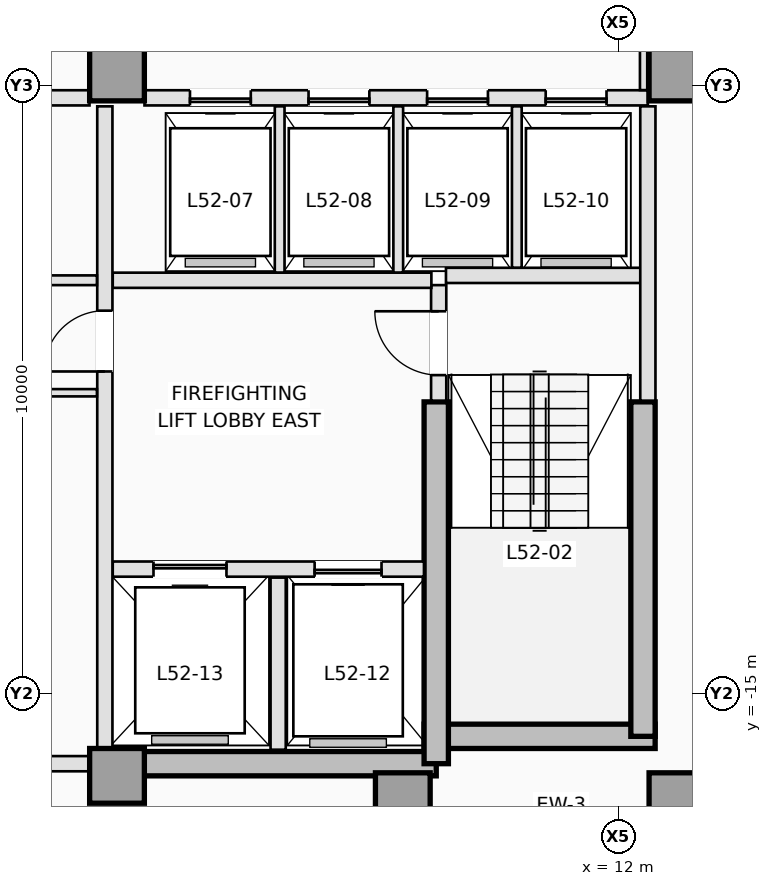
"""IFC4 building model, lengths in metres.
Left out: names, types, materials, properties, quantities, classifications, styles, units other than length and angle.
Written with IfcOpenShell. Run it as: python <this file> out.ifc"""

import sys

from ifc_helpers import new_model, si_unit, direction, frame, frame_2d, origin, origin_2d, place, context, subcontext, project, spatial, rectangle, extrude, element, fill, save


model = new_model("IFC4")
c1 = context("Model", 3, precision=1e-05, world=origin(), true_north=direction((0.0, 1.0)))
c2 = subcontext(c1, "Body", "Model", "MODEL_VIEW")
j1 = project(units=[si_unit("LENGTHUNIT", "METRE"), si_unit("PLANEANGLEUNIT", "RADIAN")], contexts=[c1])
p1 = place(None, origin())
s1 = spatial("IfcSite", under=j1, at=p1, CompositionType="ELEMENT")
p2 = place(p1, origin())
s2 = spatial("IfcBuilding", under=s1, at=p2, CompositionType="ELEMENT")
p3 = place(p2, frame((0.0, 0.0, 190.4)))
s3 = spatial("IfcBuildingStorey", under=s2, at=p3, CompositionType="ELEMENT", Elevation=190.4)
p4 = place(p3, frame((3.75, -16.15, 0.0), z_axis=(0.0, 0.0, 1.0), x_axis=(1.0, 0.0, 0.0)))
e1 = element("IfcWall", 1, at=p4, inside=s3, PredefinedType="SHEAR", context=c2, shape_type="SweptSolid", body=[
    extrude(rectangle(XDim=5.25, YDim=0.4, at=frame_2d((2.625, 0.0))), origin(), (0.0, 0.0, 1.0), 3.5),
])
p5 = place(p3, frame((8.8, -15.7, 0.0), z_axis=(0.0, 0.0, 1.0), x_axis=(1.0, 0.0, 0.0)))
e2 = element("IfcWall", 2, at=p5, inside=s3, PredefinedType="SHEAR", context=c2, shape_type="SweptSolid", body=[
    extrude(rectangle(XDim=3.8, YDim=0.4, at=frame_2d((1.9, 0.0))), origin(), (0.0, 0.0, 1.0), 3.5),
])
p6 = place(p3, frame((12.4, -15.7, 0.0), z_axis=(0.0, 0.0, 1.0), x_axis=(0.0, 1.0, 0.0)))
e3 = element("IfcWall", 3, at=p6, inside=s3, PredefinedType="SHEAR", context=c2, shape_type="SweptSolid", body=[
    extrude(rectangle(XDim=5.5, YDim=0.4, at=frame_2d((2.75, 0.0))), origin(), (0.0, 0.0, 1.0), 3.5),
])
p7 = place(p3, frame((9.0, -16.15, 0.0), z_axis=(0.0, 0.0, 1.0), x_axis=(0.0, 1.0, 0.0)))
e4 = element("IfcWall", 4, at=p7, inside=s3, PredefinedType="SHEAR", context=c2, shape_type="SweptSolid", body=[
    extrude(rectangle(XDim=5.95, YDim=0.4, at=frame_2d((2.975, 0.0))), origin(), (0.0, 0.0, 1.0), 3.5),
])
for number, where, z_axis, x_axis in (
    (5, (3.75, -16.35, 0.0), (0.0, 0.0, 1.0), (1.0, 0.0, 0.0)),
    (6, (8.45, -16.75, 0.0), (0.0, 0.0, 1.0), (1.0, 0.0, 0.0)),
    (7, (12.95, -16.75, 0.0), (0.0, 0.0, 1.0), (1.0, 0.0, 0.0)),
    (8, (3.75, -4.8, 0.0), (0.0, 0.0, 1.0), (1.0, 0.0, 0.0)),
    (9, (12.95, -4.8, 0.0), (0.0, 0.0, 1.0), (1.0, 0.0, 0.0)),
):
    element("IfcColumn", number, at=place(p3, frame(where, z_axis=z_axis, x_axis=x_axis)), inside=s3, PredefinedType="COLUMN", context=c2, shape_type="SweptSolid", body=[
        extrude(rectangle(XDim=0.9, YDim=0.9, at=origin_2d()), origin(), (0.0, 0.0, 1.0), 3.5),
    ])
p8 = place(p3, frame((9.04, -10.18, 0.0), z_axis=(0.0, 0.0, 1.0), x_axis=(0.0, 1.0, 0.0)))
e10 = element("IfcWall", 10, at=p8, inside=s3, PredefinedType="PARTITIONING", context=c2, shape_type="SweptSolid", body=[
    extrude(rectangle(XDim=1.9, YDim=0.25, at=frame_2d((0.95, 0.0))), origin(), (0.0, 0.0, 1.0), 3.25),
])
p9 = place(p8, frame((0.42, 0.0, 0.0)))
e11 = element("IfcOpeningElement", 11, at=p9, cuts=e10, PredefinedType="OPENING", context=c2, shape_type="SweptSolid", body=[
    extrude(rectangle(XDim=1.05, YDim=2.15, at=frame_2d((0.525, 1.075))), frame((0.0, 0.135, 0.0), z_axis=(0.0, -1.0, 0.0), x_axis=(1.0, 0.0, 0.0)), (0.0, 0.0, 1.0), 0.27),
])
p10 = place(p3, frame((9.16, -8.12, 0.0), z_axis=(0.0, 0.0, 1.0), x_axis=(1.0, 0.0, 0.0)))
e12 = element("IfcWall", 12, at=p10, inside=s3, PredefinedType="PARTITIONING", context=c2, shape_type="SweptSolid", body=[
    extrude(rectangle(XDim=3.22, YDim=0.25, at=frame_2d((1.61, 0.0))), origin(), (0.0, 0.0, 1.0), 3.25),
])
p11 = place(p3, frame((12.48, -10.18, 0.0), z_axis=(0.0, 0.0, 1.0), x_axis=(0.0, 1.0, 0.0)))
e13 = element("IfcWall", 13, at=p11, inside=s3, PredefinedType="PARTITIONING", context=c2, shape_type="SweptSolid", body=[
    extrude(rectangle(XDim=4.84, YDim=0.25, at=frame_2d((2.42, 0.0))), origin(), (0.0, 0.0, 1.0), 3.25),
])
p12 = place(p3, frame((3.68, -12.95, 0.0), z_axis=(0.0, 0.0, 1.0), x_axis=(1.0, 0.0, 0.0)))
e14 = element("IfcWall", 14, at=p12, inside=s3, PredefinedType="PARTITIONING", context=c2, shape_type="SweptSolid", body=[
    extrude(rectangle(XDim=5.118, YDim=0.25, at=frame_2d((2.559, 0.0))), origin(), (0.0, 0.0, 1.0), 3.25),
])
p13 = place(p12, frame((3.32, 0.0, 0.0)))
e15 = element("IfcOpeningElement", 15, at=p13, cuts=e14, PredefinedType="OPENING", context=c2, shape_type="SweptSolid", body=[
    extrude(rectangle(XDim=1.1, YDim=2.15, at=frame_2d((0.55, 1.075))), frame((0.0, 0.135, 0.0), z_axis=(0.0, -1.0, 0.0), x_axis=(1.0, 0.0, 0.0)), (0.0, 0.0, 1.0), 0.27),
])
p14 = place(p12, frame((0.67, 0.0, 0.0)))
e16 = element("IfcOpeningElement", 16, at=p14, cuts=e14, PredefinedType="OPENING", context=c2, shape_type="SweptSolid", body=[
    extrude(rectangle(XDim=1.2, YDim=2.15, at=frame_2d((0.6, 1.075))), frame((0.0, 0.135, 0.0), z_axis=(0.0, -1.0, 0.0), x_axis=(1.0, 0.0, 0.0)), (0.0, 0.0, 1.0), 0.27),
])
p15 = place(p3, frame((6.4, -15.92, 0.0), z_axis=(0.0, 0.0, 1.0), x_axis=(0.0, 1.0, 0.0)))
e17 = element("IfcWall", 17, at=p15, inside=s3, PredefinedType="PARTITIONING", context=c2, shape_type="SweptSolid", body=[
    extrude(rectangle(XDim=2.83, YDim=0.25, at=frame_2d((1.415, 0.0))), origin(), (0.0, 0.0, 1.0), 3.25),
])
p16 = place(p3, frame((3.68, -8.2, 0.0), z_axis=(0.0, 0.0, 1.0), x_axis=(1.0, 0.0, 0.0)))
e18 = element("IfcWall", 18, at=p16, inside=s3, PredefinedType="PARTITIONING", context=c2, shape_type="SweptSolid", body=[
    extrude(rectangle(XDim=5.24, YDim=0.25, at=frame_2d((2.62, 0.0))), origin(), (0.0, 0.0, 1.0), 3.25),
])
p17 = place(p3, frame((3.55, -15.898, 0.0), z_axis=(0.0, 0.0, 1.0), x_axis=(0.0, 1.0, 0.0)))
e19 = element("IfcWall", 19, at=p17, inside=s3, PredefinedType="PARTITIONING", context=c2, shape_type="SweptSolid", body=[
    extrude(rectangle(XDim=10.558, YDim=0.25, at=frame_2d((5.279, 0.0))), origin(), (0.0, 0.0, 1.0), 3.25),
])
p18 = place(p17, frame((6.198, 0.0, 0.0)))
e20 = element("IfcOpeningElement", 20, at=p18, cuts=e19, PredefinedType="OPENING", context=c2, shape_type="SweptSolid", body=[
    extrude(rectangle(XDim=1.0, YDim=2.15, at=frame_2d((0.5, 1.075))), frame((0.0, 0.135, 0.0), z_axis=(0.0, -1.0, 0.0), x_axis=(1.0, 0.0, 0.0)), (0.0, 0.0, 1.0), 0.27),
])
p19 = place(p3, frame((4.202, -5.2, 0.0), z_axis=(0.0, 0.0, 1.0), x_axis=(1.0, 0.0, 0.0)))
e21 = element("IfcWall", 21, at=p19, inside=s3, PredefinedType="PARTITIONING", context=c2, shape_type="SweptSolid", body=[
    extrude(rectangle(XDim=8.278, YDim=0.25, at=frame_2d((4.139, 0.0))), origin(), (0.0, 0.0, 1.0), 3.25),
])
p20 = place(p19, frame((0.748, 0.0, 0.0)))
e22 = element("IfcOpeningElement", 22, at=p20, cuts=e21, PredefinedType="OPENING", context=c2, shape_type="SweptSolid", body=[
    extrude(rectangle(XDim=1.0, YDim=2.15, at=frame_2d((0.5, 1.075))), frame((0.0, 0.135, 0.0), z_axis=(0.0, -1.0, 0.0), x_axis=(1.0, 0.0, 0.0)), (0.0, 0.0, 1.0), 0.27),
])
p21 = place(p19, frame((2.698, 0.0, 0.0)))
e23 = element("IfcOpeningElement", 23, at=p21, cuts=e21, PredefinedType="OPENING", context=c2, shape_type="SweptSolid", body=[
    extrude(rectangle(XDim=1.0, YDim=2.15, at=frame_2d((0.5, 1.075))), frame((0.0, 0.135, 0.0), z_axis=(0.0, -1.0, 0.0), x_axis=(1.0, 0.0, 0.0)), (0.0, 0.0, 1.0), 0.27),
])
p22 = place(p19, frame((4.648, 0.0, 0.0)))
e24 = element("IfcOpeningElement", 24, at=p22, cuts=e21, PredefinedType="OPENING", context=c2, shape_type="SweptSolid", body=[
    extrude(rectangle(XDim=1.0, YDim=2.15, at=frame_2d((0.5, 1.075))), frame((0.0, 0.135, 0.0), z_axis=(0.0, -1.0, 0.0), x_axis=(1.0, 0.0, 0.0)), (0.0, 0.0, 1.0), 0.27),
])
p23 = place(p19, frame((6.598, 0.0, 0.0)))
e25 = element("IfcOpeningElement", 25, at=p23, cuts=e21, PredefinedType="OPENING", context=c2, shape_type="SweptSolid", body=[
    extrude(rectangle(XDim=1.0, YDim=2.15, at=frame_2d((0.5, 1.075))), frame((0.0, 0.135, 0.0), z_axis=(0.0, -1.0, 0.0), x_axis=(1.0, 0.0, 0.0)), (0.0, 0.0, 1.0), 0.27),
])
p24 = place(p3, frame((0.95, -5.2, 0.0), z_axis=(0.0, 0.0, 1.0), x_axis=(1.0, 0.0, 0.0)))
e26 = element("IfcWall", 26, at=p24, inside=s3, PredefinedType="PARTITIONING", context=c2, shape_type="SweptSolid", body=[
    extrude(rectangle(XDim=2.348, YDim=0.25, at=frame_2d((1.174, 0.0))), origin(), (0.0, 0.0, 1.0), 3.25),
])
for number, where, z_axis, x_axis in (
    (27, (6.425, -8.073, 0.0), (0.0, 0.0, 1.0), (0.0, 1.0, 0.0)),
    (28, (8.375, -8.073, 0.0), (0.0, 0.0, 1.0), (0.0, 1.0, 0.0)),
):
    element("IfcWall", number, at=place(p3, frame(where, z_axis=z_axis, x_axis=x_axis)), inside=s3, PredefinedType="PARTITIONING", context=c2, shape_type="SweptSolid", body=[
        extrude(rectangle(XDim=2.733, YDim=0.16, at=frame_2d((1.366, 0.0))), origin(), (0.0, 0.0, 1.0), 3.25),
    ])
p25 = place(p3, frame((10.325, -7.993, 0.0), z_axis=(0.0, 0.0, 1.0), x_axis=(0.0, 1.0, 0.0)))
e29 = element("IfcWall", 29, at=p25, inside=s3, PredefinedType="PARTITIONING", context=c2, shape_type="SweptSolid", body=[
    extrude(rectangle(XDim=2.653, YDim=0.16, at=frame_2d((1.326, 0.0))), origin(), (0.0, 0.0, 1.0), 3.25),
])
p26 = place(p3, frame((-3.298, -16.15, 0.0), z_axis=(0.0, 0.0, 1.0), x_axis=(1.0, 0.0, 0.0)))
e30 = element("IfcWall", 30, at=p26, inside=s3, PredefinedType="PARTITIONING", context=c2, shape_type="SweptSolid", body=[
    extrude(rectangle(XDim=6.596, YDim=0.25, at=frame_2d((3.298, 0.0))), origin(), (0.0, 0.0, 1.0), 2.45),
])
p27 = place(p3, frame((-3.42, -8.2, 0.0), z_axis=(0.0, 0.0, 1.0), x_axis=(1.0, 0.0, 0.0)))
e31 = element("IfcWall", 31, at=p27, inside=s3, PredefinedType="PARTITIONING", context=c2, shape_type="SweptSolid", body=[
    extrude(rectangle(XDim=6.84, YDim=0.16, at=frame_2d((3.42, 0.0))), origin(), (0.0, 0.0, 1.0), 3.25),
])
p28 = place(p27, frame((2.92, 0.0, 0.0)))
e32 = element("IfcOpeningElement", 32, at=p28, cuts=e31, PredefinedType="OPENING", context=c2, shape_type="SweptSolid", body=[
    extrude(rectangle(XDim=1.0, YDim=2.15, at=frame_2d((0.5, 1.075))), frame((0.0, 0.09, 0.0), z_axis=(0.0, -1.0, 0.0), x_axis=(1.0, 0.0, 0.0)), (0.0, 0.0, 1.0), 0.18),
])
p29 = place(p3, frame((-3.42, -10.05, 0.0), z_axis=(0.0, 0.0, 1.0), x_axis=(1.0, 0.0, 0.0)))
e33 = element("IfcWall", 33, at=p29, inside=s3, PredefinedType="PARTITIONING", context=c2, shape_type="SweptSolid", body=[
    extrude(rectangle(XDim=6.84, YDim=0.12, at=frame_2d((3.42, 0.0))), origin(), (0.0, 0.0, 1.0), 3.25),
])
p30 = place(p29, frame((2.95, 0.0, 0.0)))
e34 = element("IfcOpeningElement", 34, at=p30, cuts=e33, PredefinedType="OPENING", context=c2, shape_type="SweptSolid", body=[
    extrude(rectangle(XDim=0.92, YDim=2.12, at=frame_2d((0.46, 1.06))), frame((0.0, 0.07, 0.0), z_axis=(0.0, -1.0, 0.0), x_axis=(1.0, 0.0, 0.0)), (0.0, 0.0, 1.0), 0.14),
])
p31 = place(p3, frame((12.41, -2.462, 0.0), z_axis=(0.0, 0.0, 1.0), x_axis=(0.0, -1.0, 0.0)))
e35 = element("IfcWall", 35, at=p31, inside=s3, PredefinedType="PARTITIONING", context=c2, shape_type="SweptSolid", body=[
    extrude(rectangle(XDim=2.611, YDim=0.12, at=frame_2d((1.306, 0.0))), origin(), (0.0, 0.0, 1.0), 3.25),
])
p32 = place(p20, origin())
e36 = element("IfcDoor", 36, at=p32, inside=s3, OperationType="SLIDING_TO_RIGHT", PredefinedType="DOOR", context=c2, shape_type="SweptSolid", body=[
    extrude(rectangle(XDim=1.0, YDim=2.15, at=frame_2d((0.5, 1.075))), frame((0.0, 0.025, 0.0), z_axis=(0.0, -1.0, 0.0), x_axis=(1.0, 0.0, 0.0)), (0.0, 0.0, 1.0), 0.05),
])
fill(e22, e36)
p33 = place(p21, origin())
e37 = element("IfcDoor", 37, at=p33, inside=s3, OperationType="SLIDING_TO_RIGHT", PredefinedType="DOOR", context=c2, shape_type="SweptSolid", body=[
    extrude(rectangle(XDim=1.0, YDim=2.15, at=frame_2d((0.5, 1.075))), frame((0.0, 0.025, 0.0), z_axis=(0.0, -1.0, 0.0), x_axis=(1.0, 0.0, 0.0)), (0.0, 0.0, 1.0), 0.05),
])
fill(e23, e37)
p34 = place(p22, origin())
e38 = element("IfcDoor", 38, at=p34, inside=s3, OperationType="SLIDING_TO_RIGHT", PredefinedType="DOOR", context=c2, shape_type="SweptSolid", body=[
    extrude(rectangle(XDim=1.0, YDim=2.15, at=frame_2d((0.5, 1.075))), frame((0.0, 0.025, 0.0), z_axis=(0.0, -1.0, 0.0), x_axis=(1.0, 0.0, 0.0)), (0.0, 0.0, 1.0), 0.05),
])
fill(e24, e38)
p35 = place(p23, origin())
e39 = element("IfcDoor", 39, at=p35, inside=s3, OperationType="SLIDING_TO_RIGHT", PredefinedType="DOOR", context=c2, shape_type="SweptSolid", body=[
    extrude(rectangle(XDim=1.0, YDim=2.15, at=frame_2d((0.5, 1.075))), frame((0.0, 0.025, 0.0), z_axis=(0.0, -1.0, 0.0), x_axis=(1.0, 0.0, 0.0)), (0.0, 0.0, 1.0), 0.05),
])
fill(e25, e39)
p36 = place(p13, origin())
e40 = element("IfcDoor", 40, at=p36, inside=s3, OperationType="SLIDING_TO_RIGHT", PredefinedType="DOOR", context=c2, shape_type="SweptSolid", body=[
    extrude(rectangle(XDim=1.1, YDim=2.15, at=frame_2d((0.55, 1.075))), frame((0.0, 0.025, 0.0), z_axis=(0.0, -1.0, 0.0), x_axis=(1.0, 0.0, 0.0)), (0.0, 0.0, 1.0), 0.05),
])
fill(e15, e40)
p37 = place(p14, origin())
e41 = element("IfcDoor", 41, at=p37, inside=s3, OperationType="SLIDING_TO_LEFT", PredefinedType="DOOR", context=c2, shape_type="SweptSolid", body=[
    extrude(rectangle(XDim=1.2, YDim=2.15, at=frame_2d((0.6, 1.075))), frame((0.0, 0.025, 0.0), z_axis=(0.0, -1.0, 0.0), x_axis=(1.0, 0.0, 0.0)), (0.0, 0.0, 1.0), 0.05),
])
fill(e16, e41)
p38 = place(p9, origin())
e42 = element("IfcDoor", 42, at=p38, inside=s3, OperationType="SINGLE_SWING_RIGHT", PredefinedType="DOOR", context=c2, shape_type="SweptSolid", body=[
    extrude(rectangle(XDim=1.05, YDim=2.15, at=frame_2d((0.525, 1.075))), frame((0.0, 0.025, 0.0), z_axis=(0.0, -1.0, 0.0), x_axis=(1.0, 0.0, 0.0)), (0.0, 0.0, 1.0), 0.05),
])
fill(e11, e42)
p39 = place(p18, origin())
e43 = element("IfcDoor", 43, at=p39, inside=s3, OperationType="SINGLE_SWING_LEFT", PredefinedType="DOOR", context=c2, shape_type="SweptSolid", body=[
    extrude(rectangle(XDim=1.0, YDim=2.15, at=frame_2d((0.5, 1.075))), frame((0.0, 0.025, 0.0), z_axis=(0.0, -1.0, 0.0), x_axis=(1.0, 0.0, 0.0)), (0.0, 0.0, 1.0), 0.05),
])
fill(e20, e43)
save(model, sys.argv[1])
